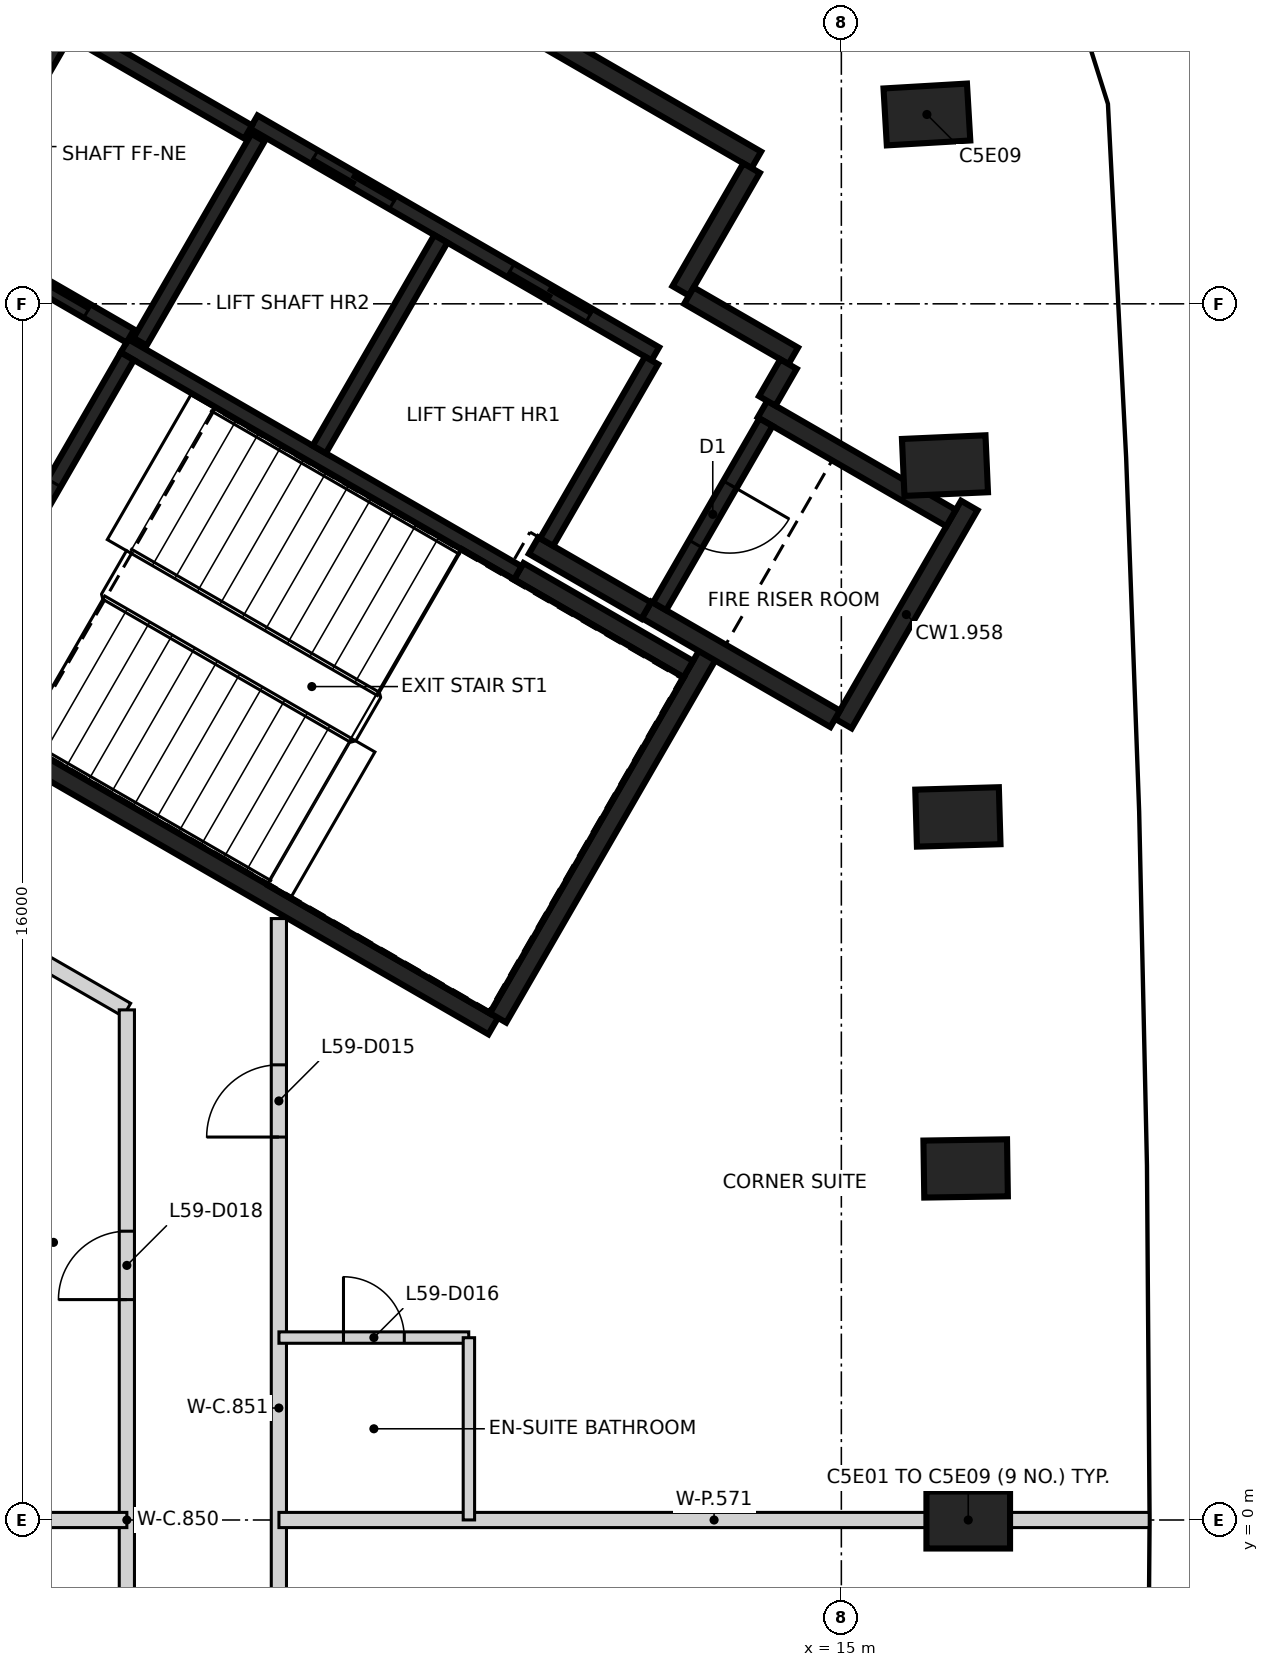
"""IFC4 building model, lengths in metres.
Left out: names, types, materials, properties, quantities, classifications, styles, units other than length and angle.
Written with IfcOpenShell. Run it as: python <this file> out.ifc"""

import sys

from ifc_helpers import new_model, si_unit, direction, frame, frame_2d, origin, origin_2d, place, context, subcontext, project, spatial, rectangle, extrude, element, fill, save


model = new_model("IFC4")
c1 = context("Model", 3, precision=1e-05, world=origin(), true_north=direction((0.0, 1.0)))
c2 = subcontext(c1, "Body", "Model", "MODEL_VIEW")
j1 = project(units=[si_unit("LENGTHUNIT", "METRE"), si_unit("PLANEANGLEUNIT", "RADIAN")], contexts=[c1])
p1 = place(None, origin())
s1 = spatial("IfcSite", under=j1, at=p1, CompositionType="ELEMENT")
p2 = place(p1, origin())
s2 = spatial("IfcBuilding", under=s1, at=p2, CompositionType="ELEMENT")
p3 = place(p2, frame((0.0, 0.0, 235.8)))
s3 = spatial("IfcBuildingStorey", under=s2, at=p3, CompositionType="ELEMENT", Elevation=235.8)
for number, where, z_axis, x_axis in (
    (1, (16.669, 0.0, -0.35), (0.0, 0.0, 1.0), (1.0, 0.0, 0.0)),
    (2, (16.635, 4.625, -0.35), (0.0, 0.0, 1.0), (1.0, 0.015, 0.0)),
    (3, (16.533, 9.25, -0.35), (0.0, 0.0, 1.0), (1.0, 0.029, 0.0)),
    (4, (16.363, 13.872, -0.35), (0.0, 0.0, 1.0), (0.999, 0.044, 0.0)),
    (5, (16.125, 18.491, -0.35), (0.0, 0.0, 1.0), (0.998, 0.058, 0.0)),
):
    element("IfcColumn", number, at=place(p3, frame(where, z_axis=z_axis, x_axis=x_axis)), inside=s3, PredefinedType="COLUMN", context=c2, shape_type="SweptSolid", body=[
        extrude(rectangle(XDim=1.1, YDim=0.75, at=origin_2d()), origin(), (0.0, 0.0, 1.0), 3.6),
    ])
p4 = place(p3, frame((10.42, 6.498, 0.0), z_axis=(0.0, 0.0, 1.0), x_axis=(-0.866021906294, 0.500006057782, 0.0)))
e6 = element("IfcWall", 6, at=p4, inside=s3, PredefinedType="SHEAR", context=c2, shape_type="SweptSolid", body=[
    extrude(rectangle(XDim=11.55, YDim=0.25, at=frame_2d((5.775, 0.0))), origin(), (0.0, 0.0, 1.0), 3.25),
])
p5 = place(p4, frame((10.025, 0.0, 0.0)))
e7 = element("IfcOpeningElement", 7, at=p5, cuts=e6, PredefinedType="OPENING", context=c2, shape_type="SweptSolid", body=[
    extrude(rectangle(XDim=1.2, YDim=2.1, at=frame_2d((0.6, 1.05))), frame((0.0, 0.135, 0.0), z_axis=(0.0, -1.0, 0.0), x_axis=(1.0, 0.0, 0.0)), (0.0, 0.0, 1.0), 0.27),
])
p6 = place(p4, frame((8.725, 0.0, 0.0)))
e8 = element("IfcOpeningElement", 8, at=p6, cuts=e6, PredefinedType="OPENING", context=c2, shape_type="SweptSolid", body=[
    extrude(rectangle(XDim=1.2, YDim=2.1, at=frame_2d((0.6, 1.05))), frame((0.0, 0.135, 0.0), z_axis=(0.0, -1.0, 0.0), x_axis=(1.0, 0.0, 0.0)), (0.0, 0.0, 1.0), 0.27),
])
p7 = place(p3, frame((6.304, 22.269, 0.0), z_axis=(0.0, 0.0, 1.0), x_axis=(0.866022959057, -0.500004234368, 0.0)))
e9 = element("IfcWall", 9, at=p7, inside=s3, PredefinedType="SHEAR", context=c2, shape_type="SweptSolid", body=[
    extrude(rectangle(XDim=8.75, YDim=0.25, at=frame_2d((4.375, 0.0))), origin(), (0.0, 0.0, 1.0), 3.25),
])
p8 = place(p3, frame((3.179, 16.856, 0.0), z_axis=(0.0, 0.0, 1.0), x_axis=(0.500001955336, 0.866024274868, 0.0)))
e10 = element("IfcWall", 10, at=p8, inside=s3, PredefinedType="SHEAR", context=c2, shape_type="SweptSolid", body=[
    extrude(rectangle(XDim=6.125, YDim=0.25, at=frame_2d((3.062, 0.0))), origin(), (0.0, 0.0, 1.0), 3.25),
])
p9 = place(p8, frame((3.563, 0.0, 0.0)))
e11 = element("IfcOpeningElement", 11, at=p9, cuts=e10, PredefinedType="OPENING", context=c2, shape_type="SweptSolid", body=[
    extrude(rectangle(XDim=1.0, YDim=2.1, at=frame_2d((0.5, 1.05))), frame((0.0, 0.135, 0.0), z_axis=(0.0, -1.0, 0.0), x_axis=(1.0, 0.0, 0.0)), (0.0, 0.0, 1.0), 0.27),
])
p10 = place(p3, frame((13.238, 11.378, 0.0), z_axis=(0.0, 0.0, 1.0), x_axis=(-0.500008851346, -0.866020293397, 0.0)))
e12 = element("IfcWall", 12, at=p10, inside=s3, PredefinedType="SHEAR", context=c2, shape_type="SweptSolid", body=[
    extrude(rectangle(XDim=5.51, YDim=0.25, at=frame_2d((2.755, 0.0))), origin(), (0.0, 0.0, 1.0), 3.25),
])
p11 = place(p3, frame((16.684, 13.347, 0.0), z_axis=(0.0, 0.0, 1.0), x_axis=(-0.499998874531, -0.866026053573, 0.0)))
e13 = element("IfcWall", 13, at=p11, inside=s3, PredefinedType="SHEAR", context=c2, shape_type="SweptSolid", body=[
    extrude(rectangle(XDim=3.313, YDim=0.25, at=frame_2d((1.656, 0.0))), origin(), (0.0, 0.0, 1.0), 3.25),
])
p12 = place(p3, frame((14.918, 10.54, 0.0), z_axis=(0.0, 0.0, 1.0), x_axis=(-0.866063538972, 0.499933942099, 0.0)))
e14 = element("IfcWall", 14, at=p12, inside=s3, PredefinedType="SHEAR", context=c2, shape_type="SweptSolid", body=[
    extrude(rectangle(XDim=2.865, YDim=0.25, at=frame_2d((1.432, 0.0))), origin(), (0.0, 0.0, 1.0), 3.25),
])
p13 = place(p3, frame((13.963, 14.614, 0.0), z_axis=(0.0, 0.0, 1.0), x_axis=(0.866042235819, -0.499970844928, 0.0)))
e15 = element("IfcWall", 15, at=p13, inside=s3, PredefinedType="SHEAR", context=c2, shape_type="SweptSolid", body=[
    extrude(rectangle(XDim=2.865, YDim=0.25, at=frame_2d((1.432, 0.0))), origin(), (0.0, 0.0, 1.0), 3.25),
])
p14 = place(p3, frame((10.757, 12.481, 0.0), z_axis=(0.0, 0.0, 1.0), x_axis=(0.866022940537, -0.500004266446, 0.0)))
e16 = element("IfcWall", 16, at=p14, inside=s3, PredefinedType="SHEAR", context=c2, shape_type="SweptSolid", body=[
    extrude(rectangle(XDim=2.575, YDim=0.25, at=frame_2d((1.287, 0.0))), origin(), (0.0, 0.0, 1.0), 3.25),
])
p15 = place(p3, frame((13.819, 17.785, 0.0), z_axis=(0.0, 0.0, 1.0), x_axis=(-0.500039802285, -0.866002422705, 0.0)))
e17 = element("IfcWall", 17, at=p15, inside=s3, PredefinedType="SHEAR", context=c2, shape_type="SweptSolid", body=[
    extrude(rectangle(XDim=1.865, YDim=0.25, at=frame_2d((0.932, 0.0))), origin(), (0.0, 0.0, 1.0), 3.25),
])
p16 = place(p3, frame((12.433, 11.964, 0.0), z_axis=(0.0, 0.0, 1.0), x_axis=(-0.866038183914, 0.499977863513, 0.0)))
e18 = element("IfcWall", 18, at=p16, inside=s3, PredefinedType="SHEAR", context=c2, shape_type="SweptSolid", body=[
    extrude(rectangle(XDim=1.71, YDim=0.25, at=frame_2d((0.855, 0.0))), origin(), (0.0, 0.0, 1.0), 3.25),
])
p17 = place(p3, frame((12.995, 16.108, 0.0), z_axis=(0.0, 0.0, 1.0), x_axis=(0.866044474677, -0.49996696679, 0.0)))
e19 = element("IfcWall", 19, at=p17, inside=s3, PredefinedType="SHEAR", context=c2, shape_type="SweptSolid", body=[
    extrude(rectangle(XDim=1.584, YDim=0.25, at=frame_2d((0.792, 0.0))), origin(), (0.0, 0.0, 1.0), 3.25),
])
p18 = place(p3, frame((14.305, 15.207, 0.0), z_axis=(0.0, 0.0, 1.0), x_axis=(-0.499848422343, -0.866112899501, 0.0)))
e20 = element("IfcWall", 20, at=p18, inside=s3, PredefinedType="SHEAR", context=c2, shape_type="SweptSolid", body=[
    extrude(rectangle(XDim=0.559, YDim=0.25, at=frame_2d((0.28, 0.0))), origin(), (0.0, 0.0, 1.0), 3.25),
])
p19 = place(p3, frame((12.552, 15.342, 0.0), z_axis=(0.0, 0.0, 1.0), x_axis=(-0.866030299012, 0.499991521122, 0.0)))
e21 = element("IfcWall", 21, at=p19, inside=s3, PredefinedType="SHEAR", context=c2, shape_type="SweptSolid", body=[
    extrude(rectangle(XDim=6.1, YDim=0.2, at=frame_2d((3.05, 0.0))), origin(), (0.0, 0.0, 1.0), 3.25),
])
p20 = place(p19, frame((1.0, 0.0, 0.0)))
e22 = element("IfcOpeningElement", 22, at=p20, cuts=e21, PredefinedType="OPENING", context=c2, shape_type="SweptSolid", body=[
    extrude(rectangle(XDim=1.2, YDim=2.1, at=frame_2d((0.6, 1.05))), frame((0.0, 0.11, 0.0), z_axis=(0.0, -1.0, 0.0), x_axis=(1.0, 0.0, 0.0)), (0.0, 0.0, 1.0), 0.22),
])
p21 = place(p19, frame((3.982, 0.0, 0.0)))
e23 = element("IfcOpeningElement", 23, at=p21, cuts=e21, PredefinedType="OPENING", context=c2, shape_type="SweptSolid", body=[
    extrude(rectangle(XDim=1.2, YDim=2.1, at=frame_2d((0.6, 1.05))), frame((0.0, 0.11, 0.0), z_axis=(0.0, -1.0, 0.0), x_axis=(1.0, 0.0, 0.0)), (0.0, 0.0, 1.0), 0.22),
])
p22 = place(p3, frame((10.743, 12.46, 0.0), z_axis=(0.0, 0.0, 1.0), x_axis=(-0.866018848283, 0.500011354289, 0.0)))
e24 = element("IfcWall", 24, at=p22, inside=s3, PredefinedType="SHEAR", context=c2, shape_type="SweptSolid", body=[
    extrude(rectangle(XDim=5.974, YDim=0.2, at=frame_2d((2.987, 0.0))), origin(), (0.0, 0.0, 1.0), 3.25),
])
p23 = place(p3, frame((3.057, 10.895, 0.0), z_axis=(0.0, 0.0, 1.0), x_axis=(0.500027839223, 0.866009330205, 0.0)))
e25 = element("IfcWall", 25, at=p23, inside=s3, PredefinedType="SHEAR", context=c2, shape_type="SweptSolid", body=[
    extrude(rectangle(XDim=5.098, YDim=0.2, at=frame_2d((2.549, 0.0))), origin(), (0.0, 0.0, 1.0), 3.25),
])
p24 = place(p23, frame((1.774, 0.0, 0.0)))
e26 = element("IfcOpeningElement", 26, at=p24, cuts=e25, PredefinedType="OPENING", context=c2, shape_type="SweptSolid", body=[
    extrude(rectangle(XDim=1.4, YDim=2.1, at=frame_2d((0.7, 1.05))), frame((0.0, 0.11, 0.0), z_axis=(0.0, -1.0, 0.0), x_axis=(1.0, 0.0, 0.0)), (0.0, 0.0, 1.0), 0.22),
])
p25 = place(p3, frame((8.132, 14.084, 0.0), z_axis=(0.0, 0.0, 1.0), x_axis=(0.500030834389, 0.86600760081, 0.0)))
e27 = element("IfcWall", 27, at=p25, inside=s3, PredefinedType="SHEAR", context=c2, shape_type="SweptSolid", body=[
    extrude(rectangle(XDim=3.198, YDim=0.2, at=frame_2d((1.599, 0.0))), origin(), (0.0, 0.0, 1.0), 3.25),
])
p26 = place(p3, frame((14.008, 14.442, 0.0), z_axis=(0.0, 0.0, 1.0), x_axis=(-0.499986818241, -0.866033014143, 0.0)))
e28 = element("IfcWall", 28, at=p26, inside=s3, PredefinedType="SHEAR", context=c2, shape_type="SweptSolid", body=[
    extrude(rectangle(XDim=2.798, YDim=0.2, at=frame_2d((1.399, 0.0))), origin(), (0.0, 0.0, 1.0), 3.25),
])
p27 = place(p26, frame((0.949, 0.0, 0.0)))
e29 = element("IfcOpeningElement", 29, at=p27, cuts=e28, PredefinedType="OPENING", context=c2, shape_type="SweptSolid", body=[
    extrude(rectangle(XDim=0.9, YDim=2.1, at=frame_2d((0.45, 1.05))), frame((0.0, 0.11, 0.0), z_axis=(0.0, -1.0, 0.0), x_axis=(1.0, 0.0, 0.0)), (0.0, 0.0, 1.0), 0.22),
])
p28 = place(p3, frame((12.502, 15.255, 0.0), z_axis=(0.0, 0.0, 1.0), x_axis=(-0.499965018551, -0.866045599391, 0.0)))
e30 = element("IfcWall", 30, at=p28, inside=s3, PredefinedType="SHEAR", context=c2, shape_type="SweptSolid", body=[
    extrude(rectangle(XDim=2.759, YDim=0.2, at=frame_2d((1.379, 0.0))), origin(), (0.0, 0.0, 1.0), 3.25),
])
p29 = place(p3, frame((7.324, 18.187, 0.0), z_axis=(0.0, 0.0, 1.0), x_axis=(-0.499967891604, -0.866043940782, 0.0)))
e31 = element("IfcWall", 31, at=p29, inside=s3, PredefinedType="SHEAR", context=c2, shape_type="SweptSolid", body=[
    extrude(rectangle(XDim=3.1, YDim=0.2, at=frame_2d((1.55, 0.0))), origin(), (0.0, 0.0, 1.0), 3.25),
])
p30 = place(p3, frame((5.646, 15.576, 0.0), z_axis=(0.0, 0.0, 1.0), x_axis=(-0.866018407898, 0.500012117035, 0.0)))
e32 = element("IfcWall", 32, at=p30, inside=s3, PredefinedType="SHEAR", context=c2, shape_type="SweptSolid", body=[
    extrude(rectangle(XDim=2.651, YDim=0.2, at=frame_2d((1.325, 0.0))), origin(), (0.0, 0.0, 1.0), 3.25),
])
p31 = place(p30, frame((0.652, 0.0, 0.0)))
e33 = element("IfcOpeningElement", 33, at=p31, cuts=e32, PredefinedType="OPENING", context=c2, shape_type="SweptSolid", body=[
    extrude(rectangle(XDim=1.3, YDim=2.1, at=frame_2d((0.65, 1.05))), frame((0.0, 0.11, 0.0), z_axis=(0.0, -1.0, 0.0), x_axis=(1.0, 0.0, 0.0)), (0.0, 0.0, 1.0), 0.22),
])
p32 = place(p3, frame((7.196, 18.26, 0.0), z_axis=(0.0, 0.0, 1.0), x_axis=(-0.866018407898, 0.500012117035, 0.0)))
e34 = element("IfcWall", 34, at=p32, inside=s3, PredefinedType="SHEAR", context=c2, shape_type="SweptSolid", body=[
    extrude(rectangle(XDim=2.651, YDim=0.2, at=frame_2d((1.325, 0.0))), origin(), (0.0, 0.0, 1.0), 3.25),
])
p33 = place(p3, frame((3.011, 8.204, 0.0), z_axis=(0.0, 0.0, 1.0), x_axis=(0.86628077395, -0.499557424812, 0.0)))
e35 = element("IfcWall", 35, at=p33, inside=s3, PredefinedType="PARTITIONING", context=c2, shape_type="SweptSolid", body=[
    extrude(rectangle(XDim=2.989, YDim=0.2, at=frame_2d((1.494, 0.0))), origin(), (0.0, 0.0, 1.0), 3.25),
])
p34 = place(p3, frame((5.6, -6.711, 0.0), z_axis=(0.0, 0.0, 1.0), x_axis=(0.0, 1.0, 0.0)))
e36 = element("IfcWall", 36, at=p34, inside=s3, PredefinedType="PARTITIONING", context=c2, shape_type="SweptSolid", body=[
    extrude(rectangle(XDim=13.422, YDim=0.2, at=frame_2d((6.711, 0.0))), origin(), (0.0, 0.0, 1.0), 3.25),
])
p35 = place(p34, frame((2.912, 0.0, 0.0)))
e37 = element("IfcOpeningElement", 37, at=p35, cuts=e36, PredefinedType="OPENING", context=c2, shape_type="SweptSolid", body=[
    extrude(rectangle(XDim=0.9, YDim=2.1, at=frame_2d((0.45, 1.05))), frame((0.0, 0.11, 0.0), z_axis=(0.0, -1.0, 0.0), x_axis=(1.0, 0.0, 0.0)), (0.0, 0.0, 1.0), 0.22),
])
p36 = place(p34, frame((9.611, 0.0, 0.0)))
e38 = element("IfcOpeningElement", 38, at=p36, cuts=e36, PredefinedType="OPENING", context=c2, shape_type="SweptSolid", body=[
    extrude(rectangle(XDim=0.9, YDim=2.1, at=frame_2d((0.45, 1.05))), frame((0.0, 0.11, 0.0), z_axis=(0.0, -1.0, 0.0), x_axis=(1.0, 0.0, 0.0)), (0.0, 0.0, 1.0), 0.22),
])
p37 = place(p3, frame((7.6, -4.966, 0.0), z_axis=(0.0, 0.0, 1.0), x_axis=(0.0, 1.0, 0.0)))
e39 = element("IfcWall", 39, at=p37, inside=s3, PredefinedType="PARTITIONING", context=c2, shape_type="SweptSolid", body=[
    extrude(rectangle(XDim=12.878, YDim=0.2, at=frame_2d((6.439, 0.0))), origin(), (0.0, 0.0, 1.0), 3.25),
])
p38 = place(p37, frame((10.004, 0.0, 0.0)))
e40 = element("IfcOpeningElement", 40, at=p38, cuts=e39, PredefinedType="OPENING", context=c2, shape_type="SweptSolid", body=[
    extrude(rectangle(XDim=0.95, YDim=2.1, at=frame_2d((0.475, 1.05))), frame((0.0, 0.11, 0.0), z_axis=(0.0, -1.0, 0.0), x_axis=(1.0, 0.0, 0.0)), (0.0, 0.0, 1.0), 0.22),
])
p39 = place(p3, frame((3.8, 0.0, 0.0), z_axis=(0.0, 0.0, 1.0), x_axis=(1.0, 0.0, 0.0)))
e41 = element("IfcWall", 41, at=p39, inside=s3, PredefinedType="PARTITIONING", context=c2, shape_type="SweptSolid", body=[
    extrude(rectangle(XDim=1.8, YDim=0.2, at=frame_2d((0.9, 0.0))), origin(), (0.0, 0.0, 1.0), 3.25),
])
p40 = place(p3, frame((7.601, 0.0, 0.0), z_axis=(0.0, 0.0, 1.0), x_axis=(1.0, 0.0, 0.0)))
e42 = element("IfcWall", 42, at=p40, inside=s3, PredefinedType="PARTITIONING", context=c2, shape_type="SweptSolid", body=[
    extrude(rectangle(XDim=11.449, YDim=0.2, at=frame_2d((5.725, 0.0))), origin(), (0.0, 0.0, 1.0), 3.25),
])
p41 = place(p3, frame((7.601, 2.4, 0.0), z_axis=(0.0, 0.0, 1.0), x_axis=(1.0, 0.0, 0.0)))
e43 = element("IfcWall", 43, at=p41, inside=s3, PredefinedType="PARTITIONING", context=c2, shape_type="SweptSolid", body=[
    extrude(rectangle(XDim=2.497, YDim=0.15, at=frame_2d((1.249, 0.0))), origin(), (0.0, 0.0, 1.0), 3.25),
])
p42 = place(p41, frame((0.849, 0.0, 0.0)))
e44 = element("IfcOpeningElement", 44, at=p42, cuts=e43, PredefinedType="OPENING", context=c2, shape_type="SweptSolid", body=[
    extrude(rectangle(XDim=0.8, YDim=2.1, at=frame_2d((0.4, 1.05))), frame((0.0, 0.085, 0.0), z_axis=(0.0, -1.0, 0.0), x_axis=(1.0, 0.0, 0.0)), (0.0, 0.0, 1.0), 0.17),
])
p43 = place(p3, frame((10.1, 0.001, 0.0), z_axis=(0.0, 0.0, 1.0), x_axis=(0.0, 1.0, 0.0)))
e45 = element("IfcWall", 45, at=p43, inside=s3, PredefinedType="PARTITIONING", context=c2, shape_type="SweptSolid", body=[
    extrude(rectangle(XDim=2.397, YDim=0.15, at=frame_2d((1.198, 0.0))), origin(), (0.0, 0.0, 1.0), 3.25),
])
p44 = place(p31, origin())
e46 = element("IfcDoor", 46, at=p44, inside=s3, OperationType="SLIDING_TO_LEFT", PredefinedType="DOOR", context=c2, shape_type="SweptSolid", body=[
    extrude(rectangle(XDim=1.3, YDim=2.1, at=frame_2d((0.65, 1.05))), frame((0.0, 0.025, 0.0), z_axis=(0.0, -1.0, 0.0), x_axis=(1.0, 0.0, 0.0)), (0.0, 0.0, 1.0), 0.05),
])
fill(e33, e46)
p45 = place(p20, origin())
e47 = element("IfcDoor", 47, at=p45, inside=s3, OperationType="DOUBLE_DOOR_SLIDING", PredefinedType="DOOR", context=c2, shape_type="SweptSolid", body=[
    extrude(rectangle(XDim=1.2, YDim=2.1, at=frame_2d((0.6, 1.05))), frame((0.0, 0.025, 0.0), z_axis=(0.0, -1.0, 0.0), x_axis=(1.0, 0.0, 0.0)), (0.0, 0.0, 1.0), 0.05),
])
fill(e22, e47)
p46 = place(p21, origin())
e48 = element("IfcDoor", 48, at=p46, inside=s3, OperationType="DOUBLE_DOOR_SLIDING", PredefinedType="DOOR", context=c2, shape_type="SweptSolid", body=[
    extrude(rectangle(XDim=1.2, YDim=2.1, at=frame_2d((0.6, 1.05))), frame((0.0, 0.025, 0.0), z_axis=(0.0, -1.0, 0.0), x_axis=(1.0, 0.0, 0.0)), (0.0, 0.0, 1.0), 0.05),
])
fill(e23, e48)
p47 = place(p24, origin())
e49 = element("IfcDoor", 49, at=p47, inside=s3, OperationType="SINGLE_SWING_LEFT", PredefinedType="DOOR", context=c2, shape_type="SweptSolid", body=[
    extrude(rectangle(XDim=1.4, YDim=2.1, at=frame_2d((0.7, 1.05))), frame((0.0, 0.025, 0.0), z_axis=(0.0, -1.0, 0.0), x_axis=(1.0, 0.0, 0.0)), (0.0, 0.0, 1.0), 0.05),
])
fill(e26, e49)
p48 = place(p27, origin())
e50 = element("IfcDoor", 50, at=p48, inside=s3, OperationType="SINGLE_SWING_RIGHT", PredefinedType="DOOR", context=c2, shape_type="SweptSolid", body=[
    extrude(rectangle(XDim=0.9, YDim=2.1, at=frame_2d((0.45, 1.05))), frame((0.0, 0.025, 0.0), z_axis=(0.0, -1.0, 0.0), x_axis=(1.0, 0.0, 0.0)), (0.0, 0.0, 1.0), 0.05),
])
fill(e29, e50)
p49 = place(p38, frame((0.95, 0.0, 0.0), z_axis=(0.0, 0.0, 1.0), x_axis=(-1.0, 0.0, 0.0)))
e51 = element("IfcDoor", 51, at=p49, inside=s3, OperationType="SINGLE_SWING_LEFT", PredefinedType="DOOR", context=c2, shape_type="SweptSolid", body=[
    extrude(rectangle(XDim=0.95, YDim=2.1, at=frame_2d((0.475, 1.05))), frame((0.0, 0.025, 0.0), z_axis=(0.0, -1.0, 0.0), x_axis=(1.0, 0.0, 0.0)), (0.0, 0.0, 1.0), 0.05),
])
fill(e40, e51)
p50 = place(p42, origin())
e52 = element("IfcDoor", 52, at=p50, inside=s3, OperationType="SINGLE_SWING_LEFT", PredefinedType="DOOR", context=c2, shape_type="SweptSolid", body=[
    extrude(rectangle(XDim=0.8, YDim=2.1, at=frame_2d((0.4, 1.05))), frame((0.0, 0.025, 0.0), z_axis=(0.0, -1.0, 0.0), x_axis=(1.0, 0.0, 0.0)), (0.0, 0.0, 1.0), 0.05),
])
fill(e44, e52)
p51 = place(p36, origin())
e53 = element("IfcDoor", 53, at=p51, inside=s3, OperationType="SINGLE_SWING_LEFT", PredefinedType="DOOR", context=c2, shape_type="SweptSolid", body=[
    extrude(rectangle(XDim=0.9, YDim=2.1, at=frame_2d((0.45, 1.05))), frame((0.0, 0.025, 0.0), z_axis=(0.0, -1.0, 0.0), x_axis=(1.0, 0.0, 0.0)), (0.0, 0.0, 1.0), 0.05),
])
fill(e38, e53)
save(model, sys.argv[1])
